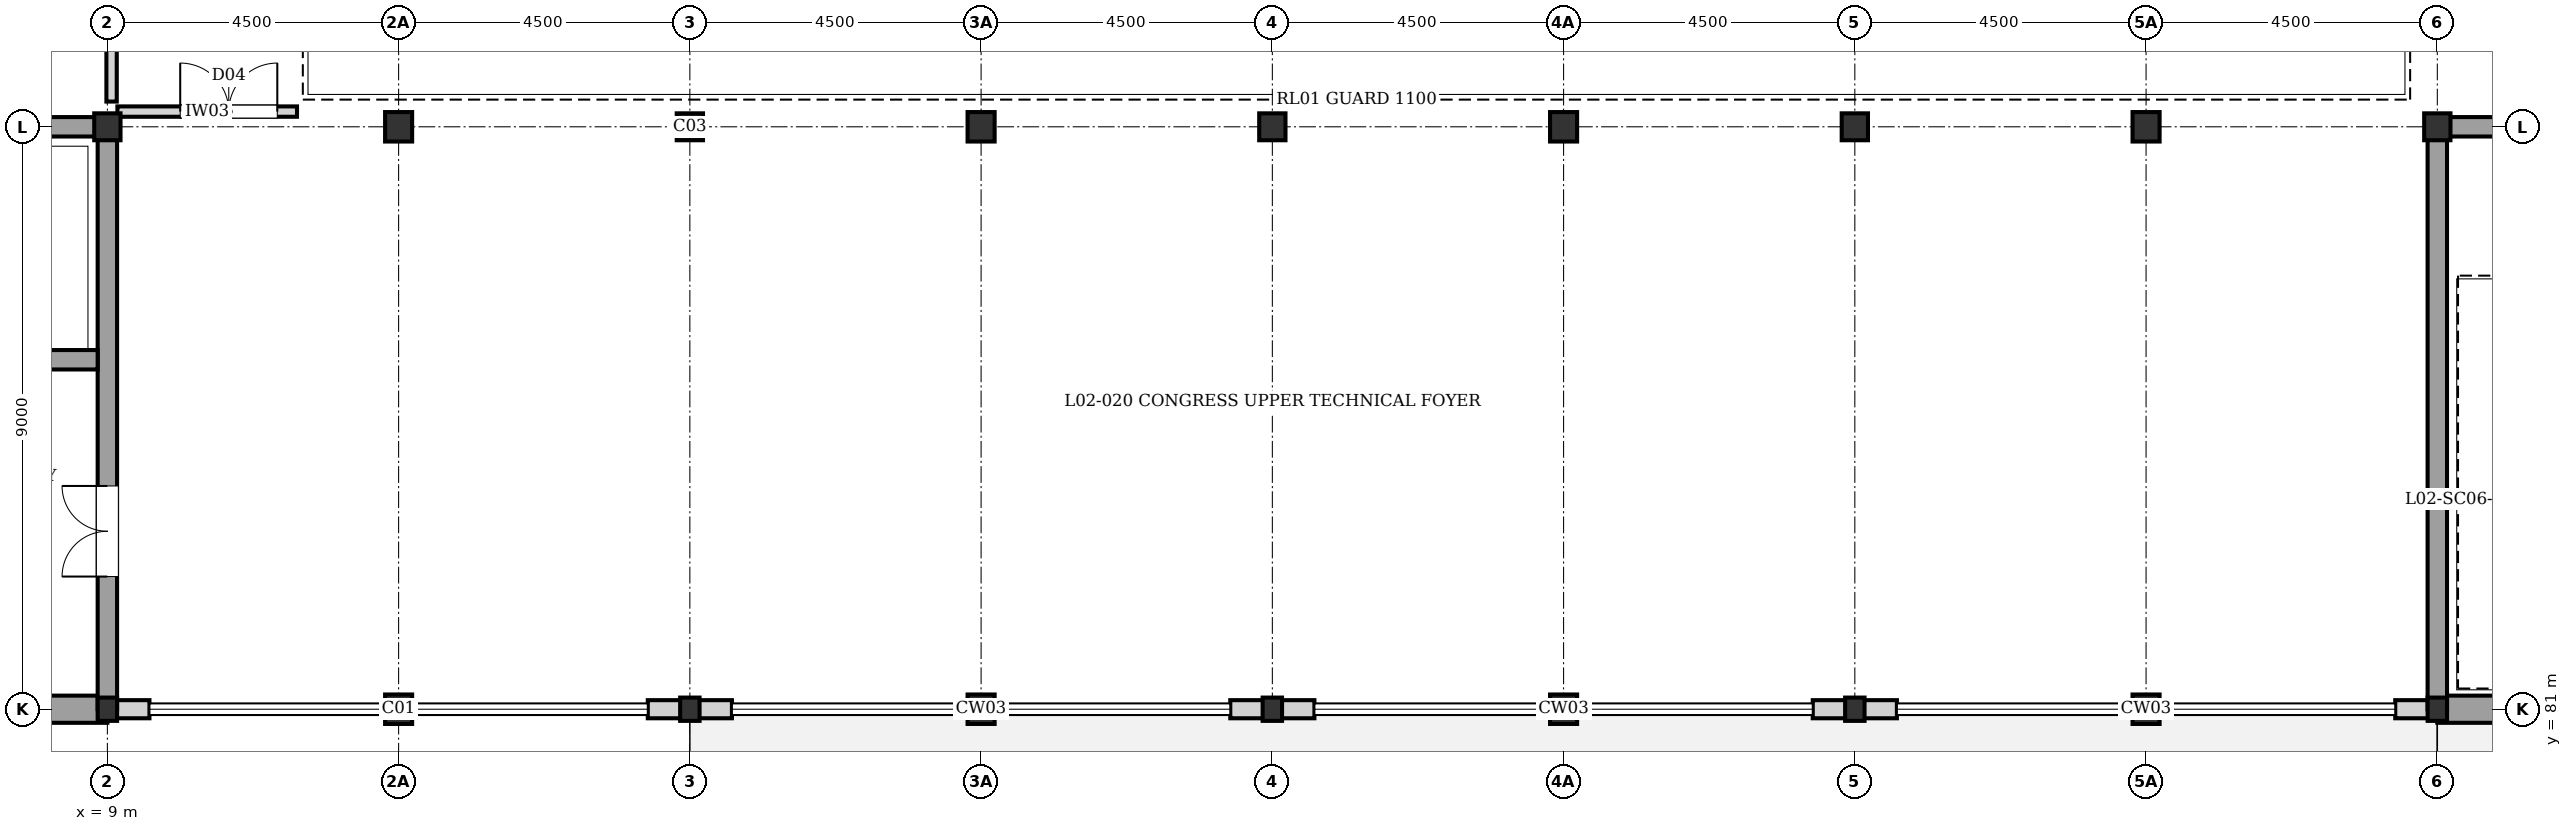
"""IFC4 building model, lengths in metres.
Left out: names, types, materials, properties, quantities, classifications, styles, units other than length and angle.
Written with IfcOpenShell. Run it as: python <this file> out.ifc"""

import sys

from ifc_helpers import new_model, si_unit, direction, frame, frame_2d, origin, origin_2d, place, context, subcontext, project, spatial, rectangle, i_section, extrude, element, fill, save


model = new_model("IFC4")
c1 = context("Model", 3, precision=1e-05, world=origin(), true_north=direction((0.0, 1.0)))
c2 = subcontext(c1, "Body", "Model", "MODEL_VIEW")
j1 = project(units=[si_unit("LENGTHUNIT", "METRE"), si_unit("PLANEANGLEUNIT", "RADIAN")], contexts=[c1])
p1 = place(None, origin())
s1 = spatial("IfcSite", under=j1, at=p1, CompositionType="ELEMENT")
p2 = place(p1, origin())
s2 = spatial("IfcBuilding", under=s1, at=p2, CompositionType="ELEMENT")
p3 = place(p2, frame((0.0, 0.0, 8.16)))
s3 = spatial("IfcBuildingStorey", under=s2, at=p3, CompositionType="ELEMENT", Elevation=8.16)
p4 = place(p3, frame((9.0, 81.0, 0.0), z_axis=(0.0, 0.0, 1.0), x_axis=(1.0, 0.0, 0.0)))
e1 = element("IfcColumn", 1, at=p4, inside=s3, PredefinedType="COLUMN", context=c2, shape_type="SweptSolid", body=[
    extrude(i_section(OverallWidth=0.3, OverallDepth=0.36, WebThickness=0.012, FlangeThickness=0.022, at=origin_2d()), origin(), (0.0, 0.0, 1.0), 3.36),
])
p5 = place(p3, frame((9.0, 90.0, 0.0), z_axis=(0.0, 0.0, 1.0), x_axis=(1.0, 0.0, 0.0)))
e2 = element("IfcColumn", 2, at=p5, inside=s3, PredefinedType="COLUMN", context=c2, shape_type="SweptSolid", body=[
    extrude(i_section(OverallWidth=0.406, OverallDepth=0.416, WebThickness=0.022, FlangeThickness=0.038, at=origin_2d()), origin(), (0.0, 0.0, 1.0), 3.36),
])
p6 = place(p3, frame((18.0, 81.0, 0.0), z_axis=(0.0, 0.0, 1.0), x_axis=(1.0, 0.0, 0.0)))
e3 = element("IfcColumn", 3, at=p6, inside=s3, PredefinedType="COLUMN", context=c2, shape_type="SweptSolid", body=[
    extrude(i_section(OverallWidth=0.3, OverallDepth=0.36, WebThickness=0.012, FlangeThickness=0.022, at=origin_2d()), origin(), (0.0, 0.0, 1.0), 3.36),
])
p7 = place(p3, frame((18.0, 90.0, 0.0), z_axis=(0.0, 0.0, 1.0), x_axis=(1.0, 0.0, 0.0)))
e4 = element("IfcColumn", 4, at=p7, inside=s3, PredefinedType="COLUMN", context=c2, shape_type="SweptSolid", body=[
    extrude(i_section(OverallWidth=0.406, OverallDepth=0.416, WebThickness=0.022, FlangeThickness=0.038, at=origin_2d()), origin(), (0.0, 0.0, 1.0), 3.36),
])
p8 = place(p3, frame((27.0, 81.0, 0.0), z_axis=(0.0, 0.0, 1.0), x_axis=(1.0, 0.0, 0.0)))
e5 = element("IfcColumn", 5, at=p8, inside=s3, PredefinedType="COLUMN", context=c2, shape_type="SweptSolid", body=[
    extrude(i_section(OverallWidth=0.3, OverallDepth=0.36, WebThickness=0.012, FlangeThickness=0.022, at=origin_2d()), origin(), (0.0, 0.0, 1.0), 3.36),
])
p9 = place(p3, frame((27.0, 90.0, 0.0), z_axis=(0.0, 0.0, 1.0), x_axis=(1.0, 0.0, 0.0)))
e6 = element("IfcColumn", 6, at=p9, inside=s3, PredefinedType="COLUMN", context=c2, shape_type="SweptSolid", body=[
    extrude(i_section(OverallWidth=0.406, OverallDepth=0.416, WebThickness=0.022, FlangeThickness=0.038, at=origin_2d()), origin(), (0.0, 0.0, 1.0), 3.36),
])
p10 = place(p3, frame((36.0, 81.0, 0.0), z_axis=(0.0, 0.0, 1.0), x_axis=(1.0, 0.0, 0.0)))
e7 = element("IfcColumn", 7, at=p10, inside=s3, PredefinedType="COLUMN", context=c2, shape_type="SweptSolid", body=[
    extrude(i_section(OverallWidth=0.3, OverallDepth=0.36, WebThickness=0.012, FlangeThickness=0.022, at=origin_2d()), origin(), (0.0, 0.0, 1.0), 3.36),
])
p11 = place(p3, frame((36.0, 90.0, 0.0), z_axis=(0.0, 0.0, 1.0), x_axis=(1.0, 0.0, 0.0)))
e8 = element("IfcColumn", 8, at=p11, inside=s3, PredefinedType="COLUMN", context=c2, shape_type="SweptSolid", body=[
    extrude(i_section(OverallWidth=0.406, OverallDepth=0.416, WebThickness=0.022, FlangeThickness=0.038, at=origin_2d()), origin(), (0.0, 0.0, 1.0), 3.36),
])
p12 = place(p3, frame((45.0, 81.0, 0.0), z_axis=(0.0, 0.0, 1.0), x_axis=(1.0, 0.0, 0.0)))
e9 = element("IfcColumn", 9, at=p12, inside=s3, PredefinedType="COLUMN", context=c2, shape_type="SweptSolid", body=[
    extrude(i_section(OverallWidth=0.3, OverallDepth=0.36, WebThickness=0.012, FlangeThickness=0.022, at=origin_2d()), origin(), (0.0, 0.0, 1.0), 3.36),
])
p13 = place(p3, frame((45.0, 90.0, 0.0), z_axis=(0.0, 0.0, 1.0), x_axis=(1.0, 0.0, 0.0)))
e10 = element("IfcColumn", 10, at=p13, inside=s3, PredefinedType="COLUMN", context=c2, shape_type="SweptSolid", body=[
    extrude(i_section(OverallWidth=0.406, OverallDepth=0.416, WebThickness=0.022, FlangeThickness=0.038, at=origin_2d()), origin(), (0.0, 0.0, 1.0), 3.36),
])
for number, where, z_axis, x_axis in (
    (11, (13.5, 81.0, 2.82), (0.0, 0.0, 1.0), (1.0, 0.0, 0.0)),
    (12, (13.5, 90.0, 2.82), (0.0, 0.0, 1.0), (1.0, 0.0, 0.0)),
    (13, (22.5, 81.0, 2.82), (0.0, 0.0, 1.0), (1.0, 0.0, 0.0)),
    (14, (22.5, 90.0, 2.82), (0.0, 0.0, 1.0), (1.0, 0.0, 0.0)),
    (15, (31.5, 81.0, 2.82), (0.0, 0.0, 1.0), (1.0, 0.0, 0.0)),
    (16, (31.5, 90.0, 2.82), (0.0, 0.0, 1.0), (1.0, 0.0, 0.0)),
    (17, (40.5, 81.0, 2.82), (0.0, 0.0, 1.0), (1.0, 0.0, 0.0)),
    (18, (40.5, 90.0, 2.82), (0.0, 0.0, 1.0), (1.0, 0.0, 0.0)),
):
    element("IfcColumn", number, at=place(p3, frame(where, z_axis=z_axis, x_axis=x_axis)), inside=s3, PredefinedType="COLUMN", context=c2, shape_type="SweptSolid", body=[
        extrude(i_section(OverallWidth=0.418, OverallDepth=0.455, WebThickness=0.032, FlangeThickness=0.056, at=origin_2d()), origin(), (0.0, 0.0, 1.0), 1.005),
    ])
p14 = place(p3, frame((54.0, 81.0, 0.0), z_axis=(0.0, 0.0, 1.0), x_axis=(-1.0, 0.0, 0.0)))
e19 = element("IfcWall", 19, at=p14, inside=s3, PredefinedType="SOLIDWALL", context=c2, shape_type="SweptSolid", body=[
    extrude(rectangle(XDim=9.0, YDim=0.42, at=frame_2d((4.5, 0.0))), origin(), (0.0, 0.0, 1.0), 3.11),
])
p15 = place(p3, frame((44.87, 81.0, 0.0), z_axis=(0.0, 0.0, 1.0), x_axis=(-1.0, 0.0, 0.0)))
e20 = element("IfcWall", 20, at=p15, inside=s3, PredefinedType="SOLIDWALL", context=c2, shape_type="SweptSolid", body=[
    extrude(rectangle(XDim=0.52, YDim=0.28, at=frame_2d((0.26, 0.0))), origin(), (0.0, 0.0, 1.0), 2.035),
])
for number, where, z_axis, x_axis in (
    (21, (36.65, 81.0, 0.0), (0.0, 0.0, 1.0), (-1.0, 0.0, 0.0)),
    (22, (36.0, 81.0, 0.0), (0.0, 0.0, 1.0), (-1.0, 0.0, 0.0)),
    (23, (27.65, 81.0, 0.0), (0.0, 0.0, 1.0), (-1.0, 0.0, 0.0)),
    (24, (27.0, 81.0, 0.0), (0.0, 0.0, 1.0), (-1.0, 0.0, 0.0)),
    (25, (18.65, 81.0, 0.0), (0.0, 0.0, 1.0), (-1.0, 0.0, 0.0)),
    (26, (18.0, 81.0, 0.0), (0.0, 0.0, 1.0), (-1.0, 0.0, 0.0)),
):
    element("IfcWall", number, at=place(p3, frame(where, z_axis=z_axis, x_axis=x_axis)), inside=s3, PredefinedType="SOLIDWALL", context=c2, shape_type="SweptSolid", body=[
        extrude(rectangle(XDim=0.65, YDim=0.28, at=frame_2d((0.325, 0.0))), origin(), (0.0, 0.0, 1.0), 2.035),
    ])
p16 = place(p3, frame((9.65, 81.0, 0.0), z_axis=(0.0, 0.0, 1.0), x_axis=(-1.0, 0.0, 0.0)))
e27 = element("IfcWall", 27, at=p16, inside=s3, PredefinedType="SOLIDWALL", context=c2, shape_type="SweptSolid", body=[
    extrude(rectangle(XDim=0.52, YDim=0.28, at=frame_2d((0.26, 0.0))), origin(), (0.0, 0.0, 1.0), 2.035),
])
p17 = place(p3, frame((9.0, 81.0, 0.0), z_axis=(0.0, 0.0, 1.0), x_axis=(-1.0, 0.0, 0.0)))
e28 = element("IfcWall", 28, at=p17, inside=s3, PredefinedType="SOLIDWALL", context=c2, shape_type="SweptSolid", body=[
    extrude(rectangle(XDim=9.0, YDim=0.42, at=frame_2d((4.5, 0.0))), origin(), (0.0, 0.0, 1.0), 3.11),
])
p18 = place(p3, frame((9.0, 81.0, 0.0), z_axis=(0.0, 0.0, 1.0), x_axis=(0.0, 1.0, 0.0)))
e29 = element("IfcWall", 29, at=p18, inside=s3, PredefinedType="SHEAR", context=c2, shape_type="SweptSolid", body=[
    extrude(rectangle(XDim=9.0, YDim=0.3, at=frame_2d((4.5, 0.0))), origin(), (0.0, 0.0, 1.0), 3.11),
])
p19 = place(p18, frame((2.05, 0.0, 0.0)))
e30 = element("IfcOpeningElement", 30, at=p19, cuts=e29, PredefinedType="OPENING", context=c2, shape_type="SweptSolid", body=[
    extrude(rectangle(XDim=1.4, YDim=2.02, at=frame_2d((0.7, 1.01))), frame((0.0, 0.16, 0.0), z_axis=(0.0, -1.0, 0.0), x_axis=(1.0, 0.0, 0.0)), (0.0, 0.0, 1.0), 0.32),
])
p20 = place(p3, frame((0.0, 90.0, 0.0), z_axis=(0.0, 0.0, 1.0), x_axis=(1.0, 0.0, 0.0)))
e31 = element("IfcWall", 31, at=p20, inside=s3, PredefinedType="SHEAR", context=c2, shape_type="SweptSolid", body=[
    extrude(rectangle(XDim=9.0, YDim=0.3, at=frame_2d((4.5, 0.0))), origin(), (0.0, 0.0, 1.0), 3.11),
])
p21 = place(p3, frame((4.65, 86.4, 0.0), z_axis=(0.0, 0.0, 1.0), x_axis=(1.0, 0.0, 0.0)))
e32 = element("IfcWall", 32, at=p21, inside=s3, PredefinedType="SHEAR", context=c2, shape_type="SweptSolid", body=[
    extrude(rectangle(XDim=4.2, YDim=0.3, at=frame_2d((2.1, 0.0))), origin(), (0.0, 0.0, 1.0), 3.11),
])
p22 = place(p21, frame((1.5, 0.0, 0.0)))
e33 = element("IfcOpeningElement", 33, at=p22, cuts=e32, PredefinedType="OPENING", context=c2, shape_type="SweptSolid", body=[
    extrude(rectangle(XDim=1.2, YDim=2.2, at=frame_2d((0.6, 1.1))), frame((0.0, 0.16, 0.0), z_axis=(0.0, -1.0, 0.0), x_axis=(1.0, 0.0, 0.0)), (0.0, 0.0, 1.0), 0.32),
])
p23 = place(p3, frame((45.0, 90.0, 0.0), z_axis=(0.0, 0.0, 1.0), x_axis=(1.0, 0.0, 0.0)))
e34 = element("IfcWall", 34, at=p23, inside=s3, PredefinedType="SHEAR", context=c2, shape_type="SweptSolid", body=[
    extrude(rectangle(XDim=9.0, YDim=0.3, at=frame_2d((4.5, 0.0))), origin(), (0.0, 0.0, 1.0), 3.11),
])
p24 = place(p23, frame((6.05, 0.0, 0.0)))
e35 = element("IfcOpeningElement", 35, at=p24, cuts=e34, PredefinedType="OPENING", context=c2, shape_type="SweptSolid", body=[
    extrude(rectangle(XDim=1.4, YDim=2.02, at=frame_2d((0.7, 1.01))), frame((0.0, 0.16, 0.0), z_axis=(0.0, -1.0, 0.0), x_axis=(1.0, 0.0, 0.0)), (0.0, 0.0, 1.0), 0.32),
])
p25 = place(p3, frame((45.0, 81.0, 0.0), z_axis=(0.0, 0.0, 1.0), x_axis=(0.0, 1.0, 0.0)))
e36 = element("IfcWall", 36, at=p25, inside=s3, PredefinedType="SHEAR", context=c2, shape_type="SweptSolid", body=[
    extrude(rectangle(XDim=9.0, YDim=0.3, at=frame_2d((4.5, 0.0))), origin(), (0.0, 0.0, 1.0), 3.11),
])
p26 = place(p3, frame((9.155, 90.235, 0.0), z_axis=(0.0, 0.0, 1.0), x_axis=(1.0, 0.0, 0.0)))
e37 = element("IfcWall", 37, at=p26, inside=s3, PredefinedType="PARTITIONING", context=c2, shape_type="SweptSolid", body=[
    extrude(rectangle(XDim=2.775, YDim=0.16, at=frame_2d((1.387, 0.0))), origin(), (0.0, 0.0, 1.0), 3.11),
])
p27 = place(p26, frame((0.97, 0.0, 0.0)))
e38 = element("IfcOpeningElement", 38, at=p27, cuts=e37, PredefinedType="OPENING", context=c2, shape_type="SweptSolid", body=[
    extrude(rectangle(XDim=1.5, YDim=2.1, at=frame_2d((0.75, 1.05))), frame((0.0, 0.09, 0.0), z_axis=(0.0, -1.0, 0.0), x_axis=(1.0, 0.0, 0.0)), (0.0, 0.0, 1.0), 0.18),
])
p28 = place(p3, frame((9.065, 90.39, 0.0), z_axis=(0.0, 0.0, 1.0), x_axis=(0.0, 1.0, 0.0)))
e39 = element("IfcWall", 39, at=p28, inside=s3, PredefinedType="PARTITIONING", context=c2, shape_type="SweptSolid", body=[
    extrude(rectangle(XDim=8.59, YDim=0.16, at=frame_2d((4.295, 0.0))), origin(), (0.0, 0.0, 1.0), 2.77),
])
p29 = place(p19, origin())
e40 = element("IfcDoor", 40, at=p29, inside=s3, OperationType="DOUBLE_DOOR_SINGLE_SWING", PredefinedType="DOOR", context=c2, shape_type="SweptSolid", body=[
    extrude(rectangle(XDim=1.4, YDim=2.02, at=frame_2d((0.7, 1.01))), frame((0.0, 0.025, 0.0), z_axis=(0.0, -1.0, 0.0), x_axis=(1.0, 0.0, 0.0)), (0.0, 0.0, 1.0), 0.05),
])
fill(e30, e40)
p30 = place(p27, origin())
e41 = element("IfcDoor", 41, at=p30, inside=s3, OperationType="DOUBLE_DOOR_SINGLE_SWING", PredefinedType="DOOR", context=c2, shape_type="SweptSolid", body=[
    extrude(rectangle(XDim=1.5, YDim=2.1, at=frame_2d((0.75, 1.05))), frame((0.0, 0.025, 0.0), z_axis=(0.0, -1.0, 0.0), x_axis=(1.0, 0.0, 0.0)), (0.0, 0.0, 1.0), 0.05),
])
fill(e38, e41)
save(model, sys.argv[1])
